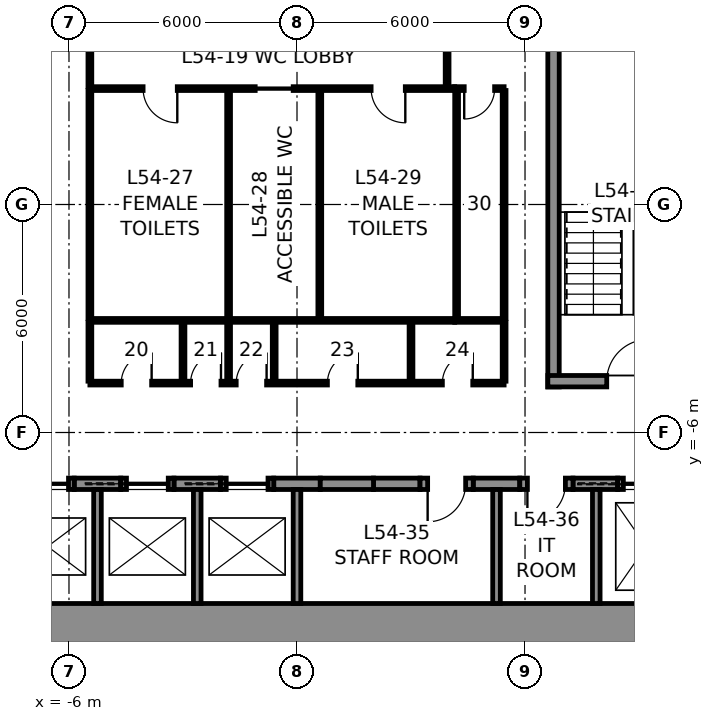
"""IFC4 building model, lengths in metres.
Left out: names, types, materials, properties, quantities, classifications, styles, units other than length and angle.
Written with IfcOpenShell. Run it as: python <this file> out.ifc"""

import sys

from ifc_helpers import new_model, si_unit, direction, frame, frame_2d, origin, place, context, subcontext, project, spatial, rectangle, extrude, element, fill, save


model = new_model("IFC4")
c1 = context("Model", 3, precision=1e-05, world=origin(), true_north=direction((0.0, 1.0)))
c2 = subcontext(c1, "Body", "Model", "MODEL_VIEW")
j1 = project(units=[si_unit("LENGTHUNIT", "METRE"), si_unit("PLANEANGLEUNIT", "RADIAN")], contexts=[c1])
p1 = place(None, origin())
s1 = spatial("IfcSite", under=j1, at=p1, CompositionType="ELEMENT")
p2 = place(p1, origin())
s2 = spatial("IfcBuilding", under=s1, at=p2, CompositionType="ELEMENT")
p3 = place(p2, frame((0.0, 0.0, 245.8)))
s3 = spatial("IfcBuildingStorey", under=s2, at=p3, CompositionType="ELEMENT", Elevation=245.8)
p4 = place(p3, frame((12.0, -11.25, 0.0), z_axis=(0.0, 0.0, 1.0), x_axis=(-1.0, 0.0, 0.0)))
e1 = element("IfcWall", 1, at=p4, inside=s3, PredefinedType="SHEAR", context=c2, shape_type="SweptSolid", body=[
    extrude(rectangle(XDim=24.0, YDim=1.5, at=frame_2d((12.0, 0.0))), origin(), (0.0, 0.0, 1.0), 4.0),
])
for number, where, z_axis, x_axis in (
    (2, (-5.863, -7.35, 0.0), (0.0, 0.0, 1.0), (1.0, 0.0, 0.0)),
    (3, (-3.238, -7.35, 0.0), (0.0, 0.0, 1.0), (1.0, 0.0, 0.0)),
    (4, (-0.613, -7.35, 0.0), (0.0, 0.0, 1.0), (1.0, 0.0, 0.0)),
    (5, (2.012, -7.35, 0.0), (0.0, 0.0, 1.0), (1.0, 0.0, 0.0)),
    (6, (4.637, -7.35, 0.0), (0.0, 0.0, 1.0), (1.0, 0.0, 0.0)),
):
    element("IfcWall", number, at=place(p3, frame(where, z_axis=z_axis, x_axis=x_axis)), inside=s3, PredefinedType="SHEAR", context=c2, shape_type="SweptSolid", body=[
        extrude(rectangle(XDim=1.225, YDim=0.3, at=frame_2d((0.613, 0.0))), origin(), (0.0, 0.0, 1.0), 4.0),
    ])
p5 = place(p3, frame((7.262, -7.35, 0.0), z_axis=(0.0, 0.0, 1.0), x_axis=(1.0, 0.0, 0.0)))
e7 = element("IfcWall", 7, at=p5, inside=s3, PredefinedType="SHEAR", context=c2, shape_type="SweptSolid", body=[
    extrude(rectangle(XDim=1.175, YDim=0.3, at=frame_2d((0.587, 0.0))), origin(), (0.0, 0.0, 1.0), 4.0),
])
p6 = place(p3, frame((-7.262, -7.35, 0.0), z_axis=(0.0, 0.0, 1.0), x_axis=(1.0, 0.0, 0.0)))
e8 = element("IfcWall", 8, at=p6, inside=s3, PredefinedType="PARTITIONING", context=c2, shape_type="SweptSolid", body=[
    extrude(rectangle(XDim=1.4, YDim=0.3, at=frame_2d((0.7, 0.0))), origin(), (0.0, 0.0, 1.0), 4.0),
])
p7 = place(p6, frame((0.15, 0.0, 0.0)))
e9 = element("IfcOpeningElement", 9, at=p7, cuts=e8, PredefinedType="OPENING", context=c2, shape_type="SweptSolid", body=[
    extrude(rectangle(XDim=1.1, YDim=2.3, at=frame_2d((0.55, 1.15))), frame((0.0, 0.16, 0.0), z_axis=(0.0, -1.0, 0.0), x_axis=(1.0, 0.0, 0.0)), (0.0, 0.0, 1.0), 0.32),
])
p8 = place(p3, frame((-4.637, -7.35, 0.0), z_axis=(0.0, 0.0, 1.0), x_axis=(1.0, 0.0, 0.0)))
e10 = element("IfcWall", 10, at=p8, inside=s3, PredefinedType="PARTITIONING", context=c2, shape_type="SweptSolid", body=[
    extrude(rectangle(XDim=1.4, YDim=0.3, at=frame_2d((0.7, 0.0))), origin(), (0.0, 0.0, 1.0), 4.0),
])
p9 = place(p8, frame((0.15, 0.0, 0.0)))
e11 = element("IfcOpeningElement", 11, at=p9, cuts=e10, PredefinedType="OPENING", context=c2, shape_type="SweptSolid", body=[
    extrude(rectangle(XDim=1.1, YDim=2.3, at=frame_2d((0.55, 1.15))), frame((0.0, 0.16, 0.0), z_axis=(0.0, -1.0, 0.0), x_axis=(1.0, 0.0, 0.0)), (0.0, 0.0, 1.0), 0.32),
])
p10 = place(p3, frame((-2.012, -7.35, 0.0), z_axis=(0.0, 0.0, 1.0), x_axis=(1.0, 0.0, 0.0)))
e12 = element("IfcWall", 12, at=p10, inside=s3, PredefinedType="PARTITIONING", context=c2, shape_type="SweptSolid", body=[
    extrude(rectangle(XDim=1.4, YDim=0.3, at=frame_2d((0.7, 0.0))), origin(), (0.0, 0.0, 1.0), 4.0),
])
p11 = place(p10, frame((0.15, 0.0, 0.0)))
e13 = element("IfcOpeningElement", 13, at=p11, cuts=e12, PredefinedType="OPENING", context=c2, shape_type="SweptSolid", body=[
    extrude(rectangle(XDim=1.1, YDim=2.3, at=frame_2d((0.55, 1.15))), frame((0.0, 0.16, 0.0), z_axis=(0.0, -1.0, 0.0), x_axis=(1.0, 0.0, 0.0)), (0.0, 0.0, 1.0), 0.32),
])
p12 = place(p3, frame((0.613, -7.35, 0.0), z_axis=(0.0, 0.0, 1.0), x_axis=(1.0, 0.0, 0.0)))
e14 = element("IfcWall", 14, at=p12, inside=s3, PredefinedType="PARTITIONING", context=c2, shape_type="SweptSolid", body=[
    extrude(rectangle(XDim=1.4, YDim=0.3, at=frame_2d((0.7, 0.0))), origin(), (0.0, 0.0, 1.0), 4.0),
])
p13 = place(p3, frame((3.238, -7.35, 0.0), z_axis=(0.0, 0.0, 1.0), x_axis=(1.0, 0.0, 0.0)))
e15 = element("IfcWall", 15, at=p13, inside=s3, PredefinedType="PARTITIONING", context=c2, shape_type="SweptSolid", body=[
    extrude(rectangle(XDim=1.4, YDim=0.3, at=frame_2d((0.7, 0.0))), origin(), (0.0, 0.0, 1.0), 4.0),
])
p14 = place(p13, frame((0.2, 0.0, 0.0)))
e16 = element("IfcOpeningElement", 16, at=p14, cuts=e15, PredefinedType="OPENING", context=c2, shape_type="SweptSolid", body=[
    extrude(rectangle(XDim=1.0, YDim=2.3, at=frame_2d((0.5, 1.15))), frame((0.0, 0.16, 0.0), z_axis=(0.0, -1.0, 0.0), x_axis=(1.0, 0.0, 0.0)), (0.0, 0.0, 1.0), 0.32),
])
p15 = place(p3, frame((5.863, -7.35, 0.0), z_axis=(0.0, 0.0, 1.0), x_axis=(1.0, 0.0, 0.0)))
e17 = element("IfcWall", 17, at=p15, inside=s3, PredefinedType="PARTITIONING", context=c2, shape_type="SweptSolid", body=[
    extrude(rectangle(XDim=1.4, YDim=0.3, at=frame_2d((0.7, 0.0))), origin(), (0.0, 0.0, 1.0), 4.0),
])
p16 = place(p15, frame((0.2, 0.0, 0.0)))
e18 = element("IfcOpeningElement", 18, at=p16, cuts=e17, PredefinedType="OPENING", context=c2, shape_type="SweptSolid", body=[
    extrude(rectangle(XDim=1.0, YDim=2.3, at=frame_2d((0.5, 1.15))), frame((0.0, 0.16, 0.0), z_axis=(0.0, -1.0, 0.0), x_axis=(1.0, 0.0, 0.0)), (0.0, 0.0, 1.0), 0.32),
])
p17 = place(p3, frame((8.438, -7.35, 0.0), z_axis=(0.0, 0.0, 1.0), x_axis=(1.0, 0.0, 0.0)))
e19 = element("IfcWall", 19, at=p17, inside=s3, PredefinedType="PARTITIONING", context=c2, shape_type="SweptSolid", body=[
    extrude(rectangle(XDim=1.5, YDim=0.3, at=frame_2d((0.75, 0.0))), origin(), (0.0, 0.0, 1.0), 4.0),
])
p18 = place(p17, frame((0.15, 0.0, 0.0)))
e20 = element("IfcOpeningElement", 20, at=p18, cuts=e19, PredefinedType="OPENING", context=c2, shape_type="SweptSolid", body=[
    extrude(rectangle(XDim=1.2, YDim=2.3, at=frame_2d((0.6, 1.15))), frame((0.0, 0.16, 0.0), z_axis=(0.0, -1.0, 0.0), x_axis=(1.0, 0.0, 0.0)), (0.0, 0.0, 1.0), 0.32),
])
for number, where, z_axis, x_axis in (
    (21, (-5.25, -10.5, 0.0), (0.0, 0.0, 1.0), (0.0, 1.0, 0.0)),
    (22, (-2.625, -10.5, 0.0), (0.0, 0.0, 1.0), (0.0, 1.0, 0.0)),
    (23, (0.0, -10.5, 0.0), (0.0, 0.0, 1.0), (0.0, 1.0, 0.0)),
    (24, (5.25, -10.5, 0.0), (0.0, 0.0, 1.0), (0.0, 1.0, 0.0)),
    (25, (7.875, -10.5, 0.0), (0.0, 0.0, 1.0), (0.0, 1.0, 0.0)),
):
    element("IfcWall", number, at=place(p3, frame(where, z_axis=z_axis, x_axis=x_axis)), inside=s3, PredefinedType="PARTITIONING", context=c2, shape_type="SweptSolid", body=[
        extrude(rectangle(XDim=3.0, YDim=0.2, at=frame_2d((1.5, 0.0))), origin(), (0.0, 0.0, 1.0), 4.0),
    ])
p19 = place(p3, frame((6.75, -4.8, 0.0), z_axis=(0.0, 0.0, 1.0), x_axis=(0.0, 1.0, 0.0)))
e26 = element("IfcWall", 26, at=p19, inside=s3, PredefinedType="SOLIDWALL", context=c2, shape_type="SweptSolid", body=[
    extrude(rectangle(XDim=9.6, YDim=0.3, at=frame_2d((4.8, 0.0))), origin(), (0.0, 0.0, 1.0), 3.75),
])
p20 = place(p3, frame((10.5, -4.65, 0.0), z_axis=(0.0, 0.0, 1.0), x_axis=(-1.0, 0.0, 0.0)))
e27 = element("IfcWall", 27, at=p20, inside=s3, PredefinedType="SOLIDWALL", context=c2, shape_type="SweptSolid", body=[
    extrude(rectangle(XDim=3.9, YDim=0.3, at=frame_2d((1.95, 0.0))), origin(), (0.0, 0.0, 1.0), 3.75),
])
p21 = place(p20, frame((1.25, 0.0, 0.0)))
e28 = element("IfcOpeningElement", 28, at=p21, cuts=e27, PredefinedType="OPENING", context=c2, shape_type="SweptSolid", body=[
    extrude(rectangle(XDim=1.1, YDim=2.3, at=frame_2d((0.55, 1.15))), frame((0.0, 0.16, 0.0), z_axis=(0.0, -1.0, 0.0), x_axis=(1.0, 0.0, 0.0)), (0.0, 0.0, 1.0), 0.32),
])
p22 = place(p3, frame((-5.45, 3.05, 0.0), z_axis=(0.0, 0.0, 1.0), x_axis=(1.0, 0.0, 0.0)))
e29 = element("IfcWall", 29, at=p22, inside=s3, PredefinedType="PARTITIONING", context=c2, shape_type="SweptSolid", body=[
    extrude(rectangle(XDim=9.6, YDim=0.1, at=frame_2d((4.8, 0.0))), origin(), (0.0, 0.0, 1.0), 3.75),
])
p23 = place(p22, frame((1.4, 0.0, 0.0)))
e30 = element("IfcOpeningElement", 30, at=p23, cuts=e29, PredefinedType="OPENING", context=c2, shape_type="SweptSolid", body=[
    extrude(rectangle(XDim=0.9, YDim=2.3, at=frame_2d((0.45, 1.15))), frame((0.0, 0.06, 0.0), z_axis=(0.0, -1.0, 0.0), x_axis=(1.0, 0.0, 0.0)), (0.0, 0.0, 1.0), 0.12),
])
p24 = place(p22, frame((4.35, 0.0, 0.0)))
e31 = element("IfcOpeningElement", 31, at=p24, cuts=e29, PredefinedType="OPENING", context=c2, shape_type="SweptSolid", body=[
    extrude(rectangle(XDim=1.0, YDim=2.3, at=frame_2d((0.5, 1.15))), frame((0.0, 0.06, 0.0), z_axis=(0.0, -1.0, 0.0), x_axis=(1.0, 0.0, 0.0)), (0.0, 0.0, 1.0), 0.12),
])
p25 = place(p22, frame((7.4, 0.0, 0.0)))
e32 = element("IfcOpeningElement", 32, at=p25, cuts=e29, PredefinedType="OPENING", context=c2, shape_type="SweptSolid", body=[
    extrude(rectangle(XDim=0.9, YDim=2.3, at=frame_2d((0.45, 1.15))), frame((0.0, 0.06, 0.0), z_axis=(0.0, -1.0, 0.0), x_axis=(1.0, 0.0, 0.0)), (0.0, 0.0, 1.0), 0.12),
])
p26 = place(p3, frame((4.15, 3.05, 0.0), z_axis=(0.0, 0.0, 1.0), x_axis=(1.0, 0.0, 0.0)))
e33 = element("IfcWall", 33, at=p26, inside=s3, PredefinedType="PARTITIONING", context=c2, shape_type="SweptSolid", body=[
    extrude(rectangle(XDim=1.3, YDim=0.1, at=frame_2d((0.65, 0.0))), origin(), (0.0, 0.0, 1.0), 3.75),
])
p27 = place(p26, frame((0.25, 0.0, 0.0)))
e34 = element("IfcOpeningElement", 34, at=p27, cuts=e33, PredefinedType="OPENING", context=c2, shape_type="SweptSolid", body=[
    extrude(rectangle(XDim=0.8, YDim=2.3, at=frame_2d((0.4, 1.15))), frame((0.0, 0.06, 0.0), z_axis=(0.0, -1.0, 0.0), x_axis=(1.0, 0.0, 0.0)), (0.0, 0.0, 1.0), 0.12),
])
p28 = place(p3, frame((4.15, -3.05, 0.0), z_axis=(0.0, 0.0, 1.0), x_axis=(-1.0, 0.0, 0.0)))
e35 = element("IfcWall", 35, at=p28, inside=s3, PredefinedType="PARTITIONING", context=c2, shape_type="SweptSolid", body=[
    extrude(rectangle(XDim=9.6, YDim=0.1, at=frame_2d((4.8, 0.0))), origin(), (0.0, 0.0, 1.0), 3.75),
])
p29 = place(p3, frame((5.45, -3.05, 0.0), z_axis=(0.0, 0.0, 1.0), x_axis=(-1.0, 0.0, 0.0)))
e36 = element("IfcWall", 36, at=p29, inside=s3, PredefinedType="PARTITIONING", context=c2, shape_type="SweptSolid", body=[
    extrude(rectangle(XDim=1.3, YDim=0.1, at=frame_2d((0.65, 0.0))), origin(), (0.0, 0.0, 1.0), 3.75),
])
for number, where, z_axis, x_axis in (
    (37, (5.45, 3.0, 0.0), (0.0, 0.0, 1.0), (0.0, -1.0, 0.0)),
    (38, (-5.45, -3.0, 0.0), (0.0, 0.0, 1.0), (0.0, 1.0, 0.0)),
    (39, (-1.8, -3.0, 0.0), (0.0, 0.0, 1.0), (0.0, 1.0, 0.0)),
    (40, (0.6, -3.0, 0.0), (0.0, 0.0, 1.0), (0.0, 1.0, 0.0)),
    (41, (4.2, -3.0, 0.0), (0.0, 0.0, 1.0), (0.0, 1.0, 0.0)),
):
    element("IfcWall", number, at=place(p3, frame(where, z_axis=z_axis, x_axis=x_axis)), inside=s3, PredefinedType="PARTITIONING", context=c2, shape_type="SweptSolid", body=[
        extrude(rectangle(XDim=6.0, YDim=0.1, at=frame_2d((3.0, 0.0))), origin(), (0.0, 0.0, 1.0), 3.75),
    ])
for number, where, z_axis, x_axis in (
    (42, (-5.45, 3.1, 0.0), (0.0, 0.0, 1.0), (0.0, 1.0, 0.0)),
    (43, (3.95, 3.1, 0.0), (0.0, 0.0, 1.0), (0.0, 1.0, 0.0)),
):
    element("IfcWall", number, at=place(p3, frame(where, z_axis=z_axis, x_axis=x_axis)), inside=s3, PredefinedType="PARTITIONING", context=c2, shape_type="SweptSolid", body=[
        extrude(rectangle(XDim=1.55, YDim=0.1, at=frame_2d((0.775, 0.0))), origin(), (0.0, 0.0, 1.0), 3.75),
    ])
p30 = place(p3, frame((5.45, -4.7, 0.0), z_axis=(0.0, 0.0, 1.0), x_axis=(-1.0, 0.0, 0.0)))
e44 = element("IfcWall", 44, at=p30, inside=s3, PredefinedType="PARTITIONING", context=c2, shape_type="SweptSolid", body=[
    extrude(rectangle(XDim=10.9, YDim=0.1, at=frame_2d((5.45, 0.0))), origin(), (0.0, 0.0, 1.0), 3.75),
])
p31 = place(p30, frame((9.275, 0.0, 0.0)))
e45 = element("IfcOpeningElement", 45, at=p31, cuts=e44, PredefinedType="OPENING", context=c2, shape_type="SweptSolid", body=[
    extrude(rectangle(XDim=0.8, YDim=2.3, at=frame_2d((0.4, 1.15))), frame((0.0, 0.06, 0.0), z_axis=(0.0, -1.0, 0.0), x_axis=(1.0, 0.0, 0.0)), (0.0, 0.0, 1.0), 0.12),
])
p32 = place(p30, frame((7.45, 0.0, 0.0)))
e46 = element("IfcOpeningElement", 46, at=p32, cuts=e44, PredefinedType="OPENING", context=c2, shape_type="SweptSolid", body=[
    extrude(rectangle(XDim=0.8, YDim=2.3, at=frame_2d((0.4, 1.15))), frame((0.0, 0.06, 0.0), z_axis=(0.0, -1.0, 0.0), x_axis=(1.0, 0.0, 0.0)), (0.0, 0.0, 1.0), 0.12),
])
p33 = place(p30, frame((6.25, 0.0, 0.0)))
e47 = element("IfcOpeningElement", 47, at=p33, cuts=e44, PredefinedType="OPENING", context=c2, shape_type="SweptSolid", body=[
    extrude(rectangle(XDim=0.8, YDim=2.3, at=frame_2d((0.4, 1.15))), frame((0.0, 0.06, 0.0), z_axis=(0.0, -1.0, 0.0), x_axis=(1.0, 0.0, 0.0)), (0.0, 0.0, 1.0), 0.12),
])
p34 = place(p30, frame((3.85, 0.0, 0.0)))
e48 = element("IfcOpeningElement", 48, at=p34, cuts=e44, PredefinedType="OPENING", context=c2, shape_type="SweptSolid", body=[
    extrude(rectangle(XDim=0.8, YDim=2.3, at=frame_2d((0.4, 1.15))), frame((0.0, 0.06, 0.0), z_axis=(0.0, -1.0, 0.0), x_axis=(1.0, 0.0, 0.0)), (0.0, 0.0, 1.0), 0.12),
])
p35 = place(p30, frame((0.825, 0.0, 0.0)))
e49 = element("IfcOpeningElement", 49, at=p35, cuts=e44, PredefinedType="OPENING", context=c2, shape_type="SweptSolid", body=[
    extrude(rectangle(XDim=0.8, YDim=2.3, at=frame_2d((0.4, 1.15))), frame((0.0, 0.06, 0.0), z_axis=(0.0, -1.0, 0.0), x_axis=(1.0, 0.0, 0.0)), (0.0, 0.0, 1.0), 0.12),
])
for number, where, z_axis, x_axis in (
    (50, (-5.45, -3.1, 0.0), (0.0, 0.0, 1.0), (0.0, -1.0, 0.0)),
    (51, (5.45, -3.1, 0.0), (0.0, 0.0, 1.0), (0.0, -1.0, 0.0)),
    (52, (-3.0, -3.1, 0.0), (0.0, 0.0, 1.0), (0.0, -1.0, 0.0)),
    (53, (-1.8, -3.1, 0.0), (0.0, 0.0, 1.0), (0.0, -1.0, 0.0)),
    (54, (-0.6, -3.1, 0.0), (0.0, 0.0, 1.0), (0.0, -1.0, 0.0)),
    (55, (3.0, -3.1, 0.0), (0.0, 0.0, 1.0), (0.0, -1.0, 0.0)),
):
    element("IfcWall", number, at=place(p3, frame(where, z_axis=z_axis, x_axis=x_axis)), inside=s3, PredefinedType="PARTITIONING", context=c2, shape_type="SweptSolid", body=[
        extrude(rectangle(XDim=1.55, YDim=0.1, at=frame_2d((0.775, 0.0))), origin(), (0.0, 0.0, 1.0), 3.75),
    ])
p36 = place(p21, frame((1.1, 0.0, 0.0), z_axis=(0.0, 0.0, 1.0), x_axis=(-1.0, 0.0, 0.0)))
e56 = element("IfcDoor", 56, at=p36, inside=s3, OperationType="SINGLE_SWING_RIGHT", PredefinedType="DOOR", context=c2, shape_type="SweptSolid", body=[
    extrude(rectangle(XDim=1.1, YDim=2.3, at=frame_2d((0.55, 1.15))), frame((0.0, 0.025, 0.0), z_axis=(0.0, -1.0, 0.0), x_axis=(1.0, 0.0, 0.0)), (0.0, 0.0, 1.0), 0.05),
])
fill(e28, e56)
p37 = place(p23, frame((0.9, 0.0, 0.0), z_axis=(0.0, 0.0, 1.0), x_axis=(-1.0, 0.0, 0.0)))
e57 = element("IfcDoor", 57, at=p37, inside=s3, OperationType="SINGLE_SWING_LEFT", PredefinedType="DOOR", context=c2, shape_type="SweptSolid", body=[
    extrude(rectangle(XDim=0.9, YDim=2.3, at=frame_2d((0.45, 1.15))), frame((0.0, 0.025, 0.0), z_axis=(0.0, -1.0, 0.0), x_axis=(1.0, 0.0, 0.0)), (0.0, 0.0, 1.0), 0.05),
])
fill(e30, e57)
p38 = place(p24, frame((1.0, 0.0, 0.0), z_axis=(0.0, 0.0, 1.0), x_axis=(-1.0, 0.0, 0.0)))
e58 = element("IfcDoor", 58, at=p38, inside=s3, OperationType="SLIDING_TO_LEFT", PredefinedType="DOOR", context=c2, shape_type="SweptSolid", body=[
    extrude(rectangle(XDim=1.0, YDim=2.3, at=frame_2d((0.5, 1.15))), frame((0.0, 0.025, 0.0), z_axis=(0.0, -1.0, 0.0), x_axis=(1.0, 0.0, 0.0)), (0.0, 0.0, 1.0), 0.05),
])
fill(e31, e58)
p39 = place(p25, frame((0.9, 0.0, 0.0), z_axis=(0.0, 0.0, 1.0), x_axis=(-1.0, 0.0, 0.0)))
e59 = element("IfcDoor", 59, at=p39, inside=s3, OperationType="SINGLE_SWING_LEFT", PredefinedType="DOOR", context=c2, shape_type="SweptSolid", body=[
    extrude(rectangle(XDim=0.9, YDim=2.3, at=frame_2d((0.45, 1.15))), frame((0.0, 0.025, 0.0), z_axis=(0.0, -1.0, 0.0), x_axis=(1.0, 0.0, 0.0)), (0.0, 0.0, 1.0), 0.05),
])
fill(e32, e59)
p40 = place(p27, frame((0.8, 0.0, 0.0), z_axis=(0.0, 0.0, 1.0), x_axis=(-1.0, 0.0, 0.0)))
e60 = element("IfcDoor", 60, at=p40, inside=s3, OperationType="SINGLE_SWING_RIGHT", PredefinedType="DOOR", context=c2, shape_type="SweptSolid", body=[
    extrude(rectangle(XDim=0.8, YDim=2.3, at=frame_2d((0.4, 1.15))), frame((0.0, 0.025, 0.0), z_axis=(0.0, -1.0, 0.0), x_axis=(1.0, 0.0, 0.0)), (0.0, 0.0, 1.0), 0.05),
])
fill(e34, e60)
p41 = place(p31, frame((0.8, 0.0, 0.0), z_axis=(0.0, 0.0, 1.0), x_axis=(-1.0, 0.0, 0.0)))
e61 = element("IfcDoor", 61, at=p41, inside=s3, OperationType="SINGLE_SWING_RIGHT", PredefinedType="DOOR", context=c2, shape_type="SweptSolid", body=[
    extrude(rectangle(XDim=0.8, YDim=2.3, at=frame_2d((0.4, 1.15))), frame((0.0, 0.025, 0.0), z_axis=(0.0, -1.0, 0.0), x_axis=(1.0, 0.0, 0.0)), (0.0, 0.0, 1.0), 0.05),
])
fill(e45, e61)
p42 = place(p32, frame((0.8, 0.0, 0.0), z_axis=(0.0, 0.0, 1.0), x_axis=(-1.0, 0.0, 0.0)))
e62 = element("IfcDoor", 62, at=p42, inside=s3, OperationType="SINGLE_SWING_RIGHT", PredefinedType="DOOR", context=c2, shape_type="SweptSolid", body=[
    extrude(rectangle(XDim=0.8, YDim=2.3, at=frame_2d((0.4, 1.15))), frame((0.0, 0.025, 0.0), z_axis=(0.0, -1.0, 0.0), x_axis=(1.0, 0.0, 0.0)), (0.0, 0.0, 1.0), 0.05),
])
fill(e46, e62)
p43 = place(p33, frame((0.8, 0.0, 0.0), z_axis=(0.0, 0.0, 1.0), x_axis=(-1.0, 0.0, 0.0)))
e63 = element("IfcDoor", 63, at=p43, inside=s3, OperationType="SINGLE_SWING_RIGHT", PredefinedType="DOOR", context=c2, shape_type="SweptSolid", body=[
    extrude(rectangle(XDim=0.8, YDim=2.3, at=frame_2d((0.4, 1.15))), frame((0.0, 0.025, 0.0), z_axis=(0.0, -1.0, 0.0), x_axis=(1.0, 0.0, 0.0)), (0.0, 0.0, 1.0), 0.05),
])
fill(e47, e63)
p44 = place(p34, frame((0.8, 0.0, 0.0), z_axis=(0.0, 0.0, 1.0), x_axis=(-1.0, 0.0, 0.0)))
e64 = element("IfcDoor", 64, at=p44, inside=s3, OperationType="SINGLE_SWING_RIGHT", PredefinedType="DOOR", context=c2, shape_type="SweptSolid", body=[
    extrude(rectangle(XDim=0.8, YDim=2.3, at=frame_2d((0.4, 1.15))), frame((0.0, 0.025, 0.0), z_axis=(0.0, -1.0, 0.0), x_axis=(1.0, 0.0, 0.0)), (0.0, 0.0, 1.0), 0.05),
])
fill(e48, e64)
p45 = place(p35, frame((0.8, 0.0, 0.0), z_axis=(0.0, 0.0, 1.0), x_axis=(-1.0, 0.0, 0.0)))
e65 = element("IfcDoor", 65, at=p45, inside=s3, OperationType="SINGLE_SWING_RIGHT", PredefinedType="DOOR", context=c2, shape_type="SweptSolid", body=[
    extrude(rectangle(XDim=0.8, YDim=2.3, at=frame_2d((0.4, 1.15))), frame((0.0, 0.025, 0.0), z_axis=(0.0, -1.0, 0.0), x_axis=(1.0, 0.0, 0.0)), (0.0, 0.0, 1.0), 0.05),
])
fill(e49, e65)
p46 = place(p14, frame((1.0, 0.0, 0.0), z_axis=(0.0, 0.0, 1.0), x_axis=(-1.0, 0.0, 0.0)))
e66 = element("IfcDoor", 66, at=p46, inside=s3, OperationType="SINGLE_SWING_RIGHT", PredefinedType="DOOR", context=c2, shape_type="SweptSolid", body=[
    extrude(rectangle(XDim=1.0, YDim=2.3, at=frame_2d((0.5, 1.15))), frame((0.0, 0.025, 0.0), z_axis=(0.0, -1.0, 0.0), x_axis=(1.0, 0.0, 0.0)), (0.0, 0.0, 1.0), 0.05),
])
fill(e16, e66)
p47 = place(p16, frame((1.0, 0.0, 0.0), z_axis=(0.0, 0.0, 1.0), x_axis=(-1.0, 0.0, 0.0)))
e67 = element("IfcDoor", 67, at=p47, inside=s3, OperationType="SINGLE_SWING_RIGHT", PredefinedType="DOOR", context=c2, shape_type="SweptSolid", body=[
    extrude(rectangle(XDim=1.0, YDim=2.3, at=frame_2d((0.5, 1.15))), frame((0.0, 0.025, 0.0), z_axis=(0.0, -1.0, 0.0), x_axis=(1.0, 0.0, 0.0)), (0.0, 0.0, 1.0), 0.05),
])
fill(e18, e67)
p48 = place(p18, origin())
e68 = element("IfcDoor", 68, at=p48, inside=s3, OperationType="SLIDING_TO_LEFT", PredefinedType="DOOR", context=c2, shape_type="SweptSolid", body=[
    extrude(rectangle(XDim=1.2, YDim=2.3, at=frame_2d((0.6, 1.15))), frame((0.0, 0.025, 0.0), z_axis=(0.0, -1.0, 0.0), x_axis=(1.0, 0.0, 0.0)), (0.0, 0.0, 1.0), 0.05),
])
fill(e20, e68)
p49 = place(p11, origin())
e69 = element("IfcDoor", 69, at=p49, inside=s3, OperationType="SLIDING_TO_LEFT", PredefinedType="DOOR", context=c2, shape_type="SweptSolid", body=[
    extrude(rectangle(XDim=1.1, YDim=2.3, at=frame_2d((0.55, 1.15))), frame((0.0, 0.025, 0.0), z_axis=(0.0, -1.0, 0.0), x_axis=(1.0, 0.0, 0.0)), (0.0, 0.0, 1.0), 0.05),
])
fill(e13, e69)
p50 = place(p9, origin())
e70 = element("IfcDoor", 70, at=p50, inside=s3, OperationType="SLIDING_TO_LEFT", PredefinedType="DOOR", context=c2, shape_type="SweptSolid", body=[
    extrude(rectangle(XDim=1.1, YDim=2.3, at=frame_2d((0.55, 1.15))), frame((0.0, 0.025, 0.0), z_axis=(0.0, -1.0, 0.0), x_axis=(1.0, 0.0, 0.0)), (0.0, 0.0, 1.0), 0.05),
])
fill(e11, e70)
p51 = place(p7, origin())
e71 = element("IfcDoor", 71, at=p51, inside=s3, OperationType="SLIDING_TO_LEFT", PredefinedType="DOOR", context=c2, shape_type="SweptSolid", body=[
    extrude(rectangle(XDim=1.1, YDim=2.3, at=frame_2d((0.55, 1.15))), frame((0.0, 0.025, 0.0), z_axis=(0.0, -1.0, 0.0), x_axis=(1.0, 0.0, 0.0)), (0.0, 0.0, 1.0), 0.05),
])
fill(e9, e71)
save(model, sys.argv[1])
